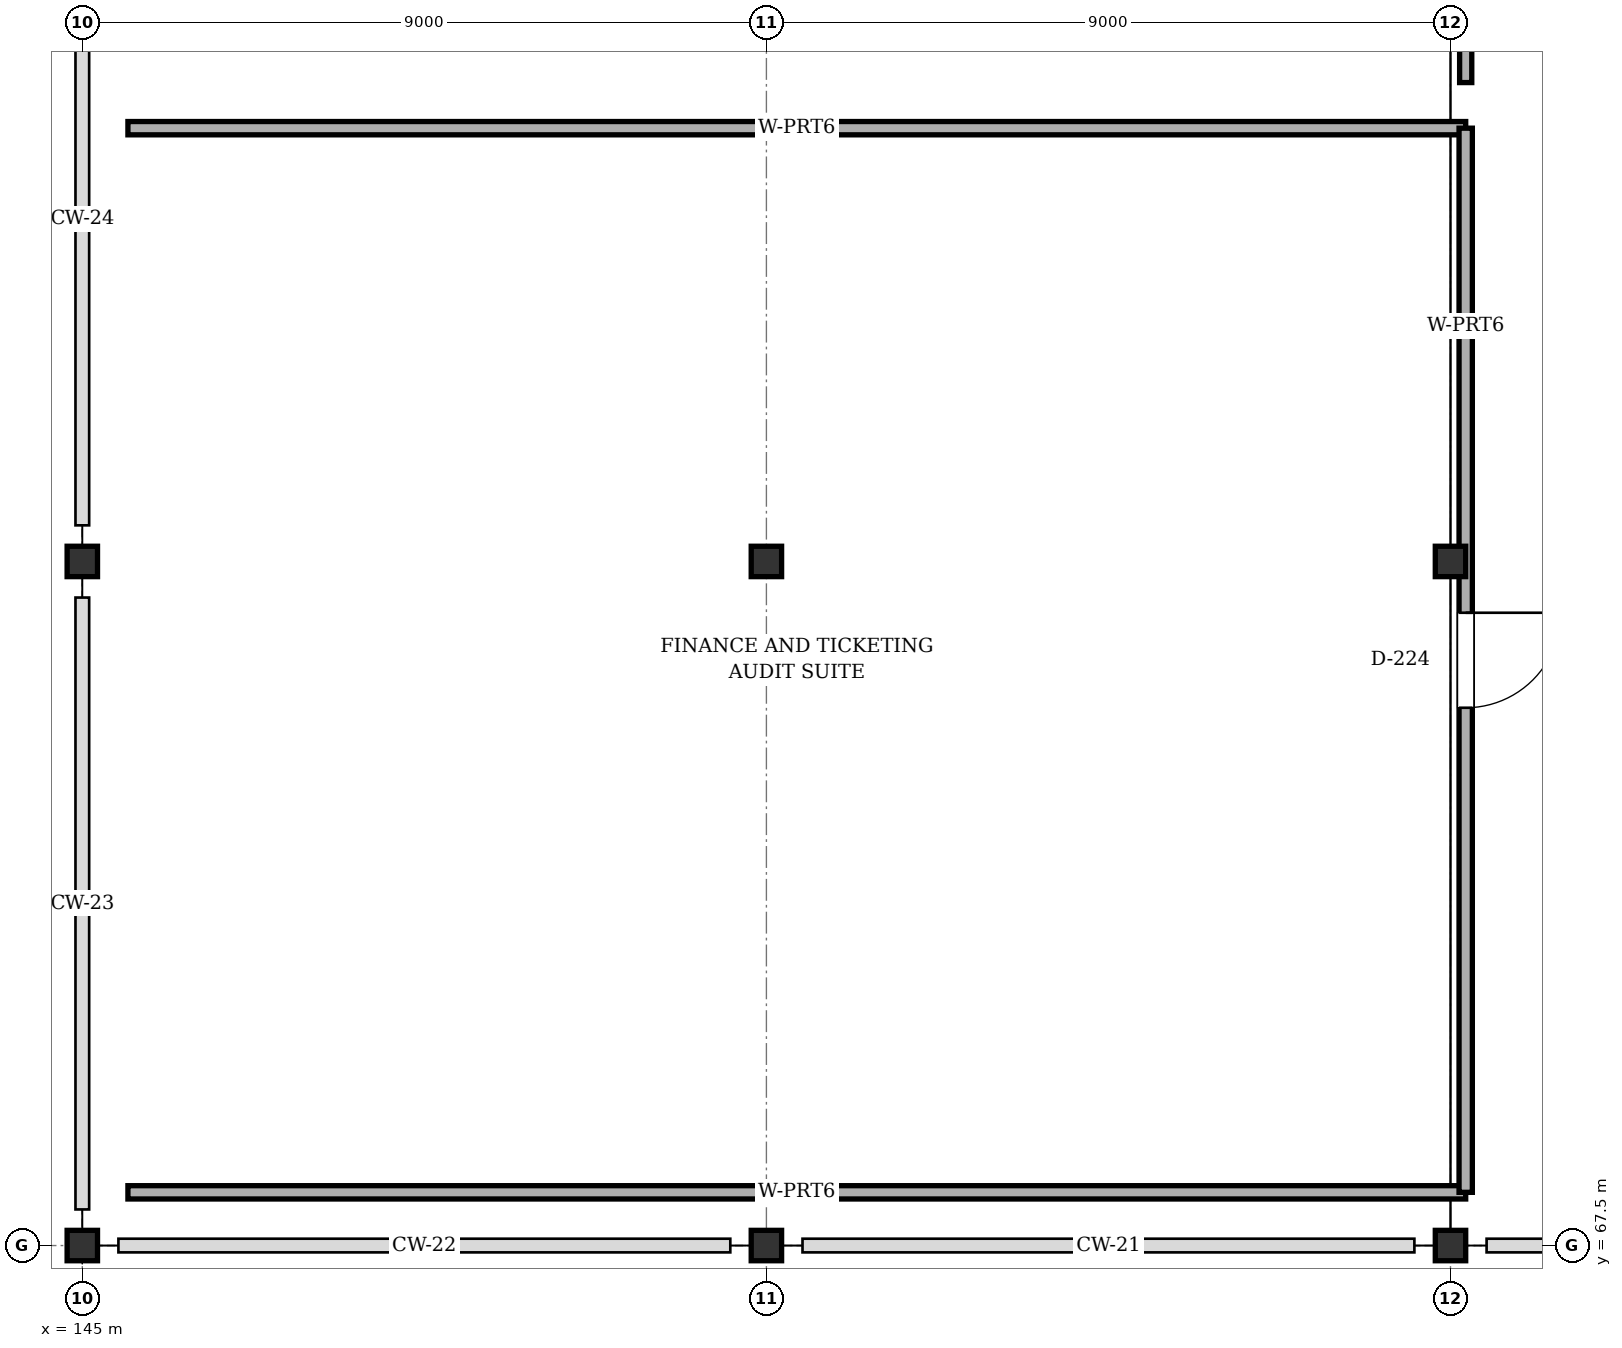
"""IFC4 building model, lengths in metres.
Left out: names, types, materials, properties, quantities, classifications, styles, units other than length and angle.
Written with IfcOpenShell. Run it as: python <this file> out.ifc"""

import sys

from ifc_helpers import new_model, si_unit, direction, frame, frame_2d, origin, origin_2d, place, context, subcontext, project, spatial, rectangle, i_section, extrude, element, fill, save


model = new_model("IFC4")
c1 = context("Model", 3, precision=1e-05, world=origin(), true_north=direction((0.0, 1.0)))
c2 = subcontext(c1, "Body", "Model", "MODEL_VIEW")
j1 = project(units=[si_unit("LENGTHUNIT", "METRE"), si_unit("PLANEANGLEUNIT", "RADIAN")], contexts=[c1])
p1 = place(None, origin())
s1 = spatial("IfcSite", under=j1, at=p1, CompositionType="ELEMENT")
p2 = place(p1, origin())
s2 = spatial("IfcBuilding", under=s1, at=p2, CompositionType="ELEMENT")
p3 = place(p2, frame((0.0, 0.0, 14.4)))
s3 = spatial("IfcBuildingStorey", under=s2, at=p3, CompositionType="ELEMENT", Elevation=14.4)
for number, where, z_axis, x_axis in (
    (1, (145.0, 67.5, 0.0), (0.0, 0.0, 1.0), (1.0, 0.0, 0.0)),
    (2, (145.0, 76.5, 0.0), (0.0, 0.0, 1.0), (1.0, 0.0, 0.0)),
    (3, (154.0, 67.5, 0.0), (0.0, 0.0, 1.0), (1.0, 0.0, 0.0)),
    (4, (154.0, 76.5, 0.0), (0.0, 0.0, 1.0), (1.0, 0.0, 0.0)),
    (5, (163.0, 67.5, 0.0), (0.0, 0.0, 1.0), (1.0, 0.0, 0.0)),
    (6, (163.0, 76.5, 0.0), (0.0, 0.0, 1.0), (1.0, 0.0, 0.0)),
):
    element("IfcColumn", number, at=place(p3, frame(where, z_axis=z_axis, x_axis=x_axis)), inside=s3, PredefinedType="COLUMN", context=c2, shape_type="SweptSolid", body=[
        extrude(i_section(OverallWidth=0.4, OverallDepth=0.4, WebThickness=0.013, FlangeThickness=0.021, FilletRadius=0.022, at=origin_2d()), origin(), (0.0, 0.0, 1.0), 3.2),
    ])
p4 = place(p3, frame((163.2, 68.2, 0.0), z_axis=(0.0, 0.0, 1.0), x_axis=(-1.0, 0.0, 0.0)))
e7 = element("IfcWall", 7, at=p4, inside=s3, PredefinedType="PARTITIONING", context=c2, shape_type="SweptSolid", body=[
    extrude(rectangle(XDim=17.6, YDim=0.175, at=frame_2d((8.8, 0.0))), origin(), (0.0, 0.0, 1.0), 2.505),
])
p5 = place(p3, frame((145.6, 82.2, 0.0), z_axis=(0.0, 0.0, 1.0), x_axis=(1.0, 0.0, 0.0)))
e8 = element("IfcWall", 8, at=p5, inside=s3, PredefinedType="PARTITIONING", context=c2, shape_type="SweptSolid", body=[
    extrude(rectangle(XDim=17.6, YDim=0.175, at=frame_2d((8.8, 0.0))), origin(), (0.0, 0.0, 1.0), 2.555),
])
p6 = place(p3, frame((163.2, 82.2, 0.0), z_axis=(0.0, 0.0, 1.0), x_axis=(0.0, -1.0, 0.0)))
e9 = element("IfcWall", 9, at=p6, inside=s3, PredefinedType="PARTITIONING", context=c2, shape_type="SweptSolid", body=[
    extrude(rectangle(XDim=14.0, YDim=0.175, at=frame_2d((7.0, 0.0))), origin(), (0.0, 0.0, 1.0), 2.505),
])
p7 = place(p6, frame((6.375, 0.0, 0.0)))
e10 = element("IfcOpeningElement", 10, at=p7, cuts=e9, PredefinedType="OPENING", context=c2, shape_type="SweptSolid", body=[
    extrude(rectangle(XDim=1.25, YDim=2.1, at=frame_2d((0.625, 1.05))), frame((0.0, 0.097, 0.0), z_axis=(0.0, -1.0, 0.0), x_axis=(1.0, 0.0, 0.0)), (0.0, 0.0, 1.0), 0.195),
])
p8 = place(p3, frame((163.2, 95.8, 0.0), z_axis=(0.0, 0.0, 1.0), x_axis=(0.0, -1.0, 0.0)))
e11 = element("IfcWall", 11, at=p8, inside=s3, PredefinedType="PARTITIONING", context=c2, shape_type="SweptSolid", body=[
    extrude(rectangle(XDim=13.0, YDim=0.16, at=frame_2d((6.5, 0.0))), origin(), (0.0, 0.0, 1.0), 2.535),
])
p9 = place(p8, frame((5.825, 0.0, 0.0)))
e12 = element("IfcOpeningElement", 12, at=p9, cuts=e11, PredefinedType="OPENING", context=c2, shape_type="SweptSolid", body=[
    extrude(rectangle(XDim=1.35, YDim=2.1, at=frame_2d((0.675, 1.05))), frame((0.0, 0.09, 0.0), z_axis=(0.0, -1.0, 0.0), x_axis=(1.0, 0.0, 0.0)), (0.0, 0.0, 1.0), 0.18),
])
p10 = place(p8, frame((8.28, 0.0, 0.0)))
e13 = element("IfcOpeningElement", 13, at=p10, cuts=e11, PredefinedType="OPENING", context=c2, shape_type="SweptSolid", body=[
    extrude(rectangle(XDim=1.35, YDim=2.1, at=frame_2d((0.675, 1.05))), frame((0.0, 0.09, 0.0), z_axis=(0.0, -1.0, 0.0), x_axis=(1.0, 0.0, 0.0)), (0.0, 0.0, 1.0), 0.18),
])
p11 = place(p7, origin())
e14 = element("IfcDoor", 14, at=p11, inside=s3, OperationType="SINGLE_SWING_LEFT", PredefinedType="DOOR", context=c2, shape_type="SweptSolid", body=[
    extrude(rectangle(XDim=1.25, YDim=2.1, at=frame_2d((0.625, 1.05))), frame((0.0, 0.025, 0.0), z_axis=(0.0, -1.0, 0.0), x_axis=(1.0, 0.0, 0.0)), (0.0, 0.0, 1.0), 0.05),
])
fill(e10, e14)
save(model, sys.argv[1])
